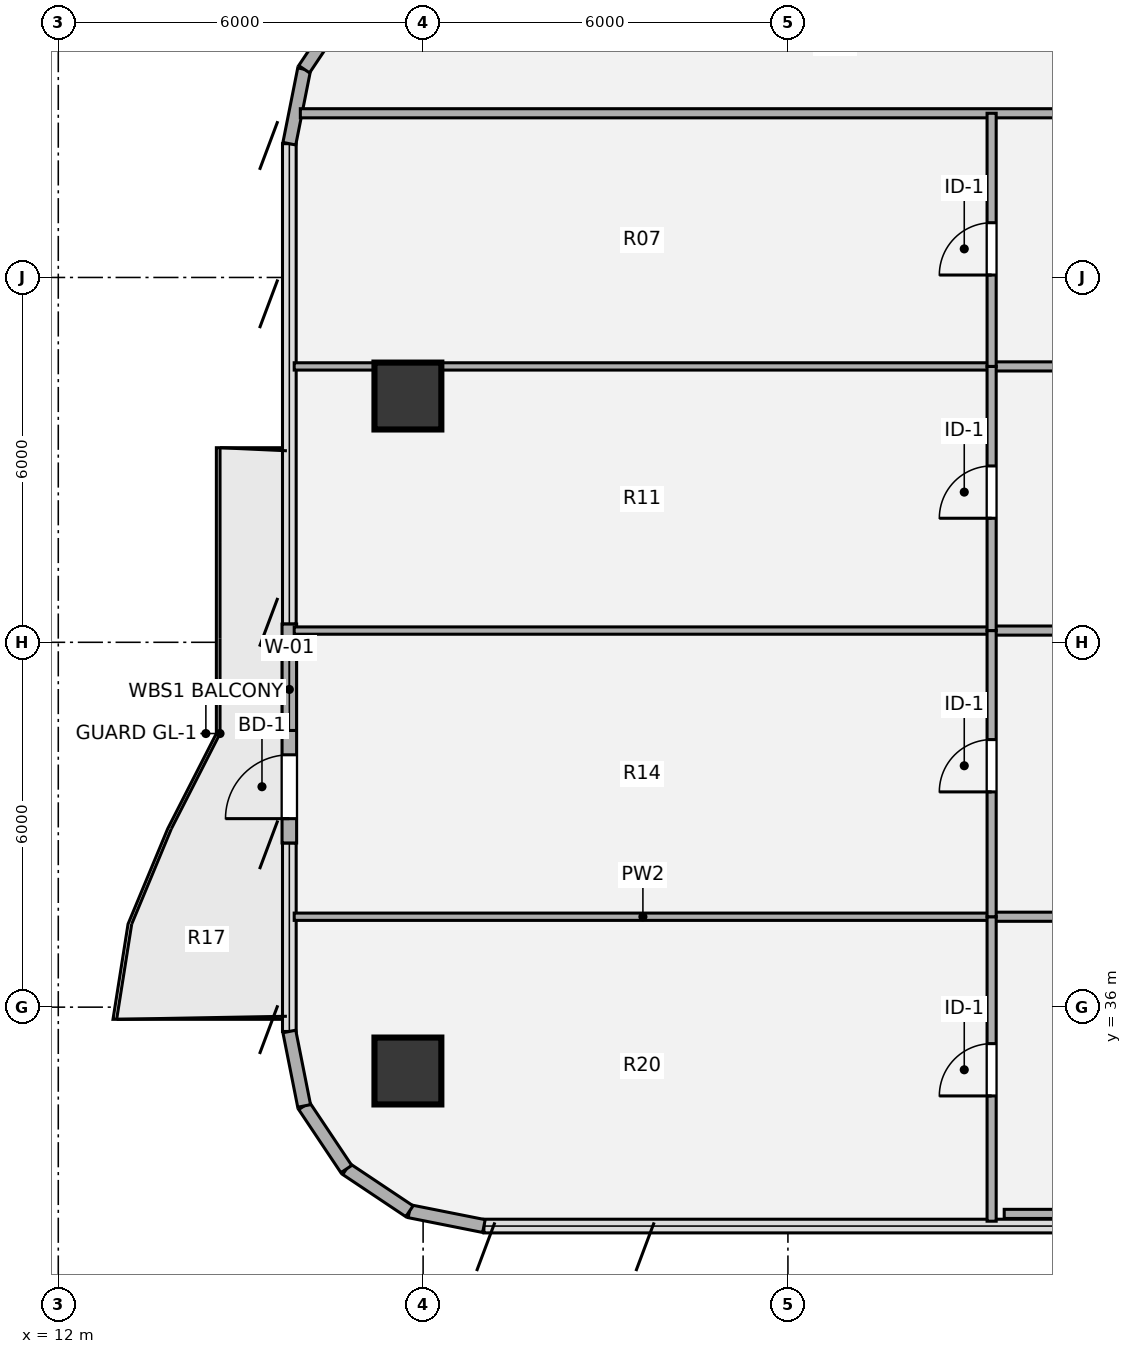
"""IFC4 building model, lengths in metres.
Left out: names, types, materials, properties, quantities, classifications, styles, units other than length and angle.
Written with IfcOpenShell. Run it as: python <this file> out.ifc"""

import sys

from ifc_helpers import new_model, si_unit, direction, frame, frame_2d, origin, origin_2d, place, context, subcontext, project, spatial, rectangle, hollow_circle, extrude, source, transform, mapped, element, fill, save


model = new_model("IFC4")
c1 = context("Model", 3, precision=1e-05, world=origin(), true_north=direction((0.0, 1.0)))
c2 = subcontext(c1, "Body", "Model", "MODEL_VIEW")
j1 = project(units=[si_unit("LENGTHUNIT", "METRE"), si_unit("PLANEANGLEUNIT", "RADIAN")], contexts=[c1])
p1 = place(None, origin())
s1 = spatial("IfcSite", under=j1, at=p1, CompositionType="ELEMENT")
p2 = place(p1, origin())
s2 = spatial("IfcBuilding", under=s1, at=p2, CompositionType="ELEMENT")
p3 = place(p2, frame((0.0, 0.0, 201.78)))
s3 = spatial("IfcBuildingStorey", under=s2, at=p3, CompositionType="ELEMENT", Elevation=201.78)
m1 = source(origin(), c2, "Body", "SweptSolid", [
    extrude(hollow_circle(Radius=0.55, WallThickness=0.04, at=origin_2d()), origin(), (0.0, 0.0, 1.0), 3.78),
])
for number, where, z_axis, x_axis in (
    (1, (17.75, 34.95, 0.0), (0.0, 0.0, 1.0), (1.0, 0.0, 0.0)),
    (2, (17.75, 46.05, 0.0), (0.0, 0.0, 1.0), (1.0, 0.0, 0.0)),
):
    element("IfcColumn", number, at=place(p3, frame(where, z_axis=z_axis, x_axis=x_axis)), inside=s3, PredefinedType="COLUMN", context=c2, shape_type="MappedRepresentation", body=[
        mapped(m1, transform((0.0, 0.0, 0.0), x_axis=(1.0, 0.0, 0.0), y_axis=(0.0, 1.0, 0.0), z_axis=(0.0, 0.0, 1.0), scale=1.0)),
    ])
for number, where, z_axis, x_axis in (
    (3, (19.0, 32.4, 0.0), (0.0, 0.0, 1.0), (-0.981, 0.195, 0.0)),
    (4, (17.775, 32.644, 0.0), (0.0, 0.0, 1.0), (-0.831, 0.556, 0.0)),
    (5, (16.737, 33.337, 0.0), (0.0, 0.0, 1.0), (-0.556, 0.831, 0.0)),
    (6, (16.044, 34.375, 0.0), (0.0, 0.0, 1.0), (-0.195, 0.981, 0.0)),
):
    element("IfcWall", number, at=place(p3, frame(where, z_axis=z_axis, x_axis=x_axis)), inside=s3, PredefinedType="SOLIDWALL", context=c2, shape_type="SweptSolid", body=[
        extrude(rectangle(XDim=1.249, YDim=0.215, at=frame_2d((0.624, 0.0))), origin(), (0.0, 0.0, 1.0), 3.53),
    ])
p4 = place(p3, frame((15.8, 38.7, 0.0), z_axis=(0.0, 0.0, 1.0), x_axis=(0.0, 1.0, 0.0)))
e7 = element("IfcWall", 7, at=p4, inside=s3, PredefinedType="SOLIDWALL", context=c2, shape_type="SweptSolid", body=[
    extrude(rectangle(XDim=3.6, YDim=0.24, at=frame_2d((1.8, 0.0))), origin(), (0.0, 0.0, 1.0), 3.53),
])
p5 = place(p4, frame((0.4, 0.0, 0.0)))
e8 = element("IfcOpeningElement", 8, at=p5, cuts=e7, PredefinedType="OPENING", context=c2, shape_type="SweptSolid", body=[
    extrude(rectangle(XDim=1.05, YDim=2.15, at=origin_2d()), frame((0.525, 0.13, 1.075), z_axis=(0.0, -1.0, 0.0), x_axis=(1.0, 0.0, 0.0)), (0.0, 0.0, 1.0), 0.26),
])
p6 = place(p4, frame((1.85, 0.0, 0.85)))
e9 = element("IfcOpeningElement", 9, at=p6, cuts=e7, PredefinedType="OPENING", context=c2, shape_type="SweptSolid", body=[
    extrude(rectangle(XDim=1.35, YDim=1.35, at=origin_2d()), frame((0.675, 0.13, 0.675), z_axis=(0.0, -1.0, 0.0), x_axis=(1.0, 0.0, 0.0)), (0.0, 0.0, 1.0), 0.26),
])
for number, where, z_axis, x_axis in (
    (10, (15.8, 50.2, 0.0), (0.0, 0.0, 1.0), (0.195, 0.981, 0.0)),
    (11, (16.044, 51.425, 0.0), (0.0, 0.0, 1.0), (0.556, 0.831, 0.0)),
):
    element("IfcWall", number, at=place(p3, frame(where, z_axis=z_axis, x_axis=x_axis)), inside=s3, PredefinedType="SOLIDWALL", context=c2, shape_type="SweptSolid", body=[
        extrude(rectangle(XDim=1.249, YDim=0.215, at=frame_2d((0.624, 0.0))), origin(), (0.0, 0.0, 1.0), 3.53),
    ])
p7 = place(p3, frame((27.557, 32.6, 0.0), z_axis=(0.0, 0.0, 1.0), x_axis=(1.0, 0.0, 0.0)))
e12 = element("IfcWall", 12, at=p7, inside=s3, PredefinedType="PARTITIONING", context=c2, shape_type="SweptSolid", body=[
    extrude(rectangle(XDim=5.993, YDim=0.15, at=frame_2d((2.997, 0.0))), origin(), (0.0, 0.0, 1.0), 3.5),
])
p8 = place(p3, frame((15.88, 37.487, 0.0), z_axis=(0.0, 0.0, 1.0), x_axis=(1.0, 0.0, 0.0)))
e13 = element("IfcWall", 13, at=p8, inside=s3, PredefinedType="PARTITIONING", context=c2, shape_type="SweptSolid", body=[
    extrude(rectangle(XDim=11.47, YDim=0.12, at=frame_2d((5.735, 0.0))), origin(), (0.0, 0.0, 1.0), 3.055),
])
p9 = place(p3, frame((27.35, 37.487, 0.0), z_axis=(0.0, 0.0, 1.0), x_axis=(1.0, 0.0, 0.0)))
e14 = element("IfcWall", 14, at=p9, inside=s3, PredefinedType="PARTITIONING", context=c2, shape_type="SweptSolid", body=[
    extrude(rectangle(XDim=6.2, YDim=0.15, at=frame_2d((3.1, 0.0))), origin(), (0.0, 0.0, 1.0), 3.055),
])
p10 = place(p3, frame((15.88, 42.193, 0.0), z_axis=(0.0, 0.0, 1.0), x_axis=(1.0, 0.0, 0.0)))
e15 = element("IfcWall", 15, at=p10, inside=s3, PredefinedType="PARTITIONING", context=c2, shape_type="SweptSolid", body=[
    extrude(rectangle(XDim=11.47, YDim=0.12, at=frame_2d((5.735, 0.0))), origin(), (0.0, 0.0, 1.0), 2.982),
])
p11 = place(p3, frame((27.35, 42.193, 0.0), z_axis=(0.0, 0.0, 1.0), x_axis=(1.0, 0.0, 0.0)))
e16 = element("IfcWall", 16, at=p11, inside=s3, PredefinedType="PARTITIONING", context=c2, shape_type="SweptSolid", body=[
    extrude(rectangle(XDim=6.2, YDim=0.15, at=frame_2d((3.1, 0.0))), origin(), (0.0, 0.0, 1.0), 2.982),
])
p12 = place(p3, frame((15.88, 46.537, 0.0), z_axis=(0.0, 0.0, 1.0), x_axis=(1.0, 0.0, 0.0)))
e17 = element("IfcWall", 17, at=p12, inside=s3, PredefinedType="PARTITIONING", context=c2, shape_type="SweptSolid", body=[
    extrude(rectangle(XDim=11.47, YDim=0.12, at=frame_2d((5.735, 0.0))), origin(), (0.0, 0.0, 1.0), 3.5),
])
p13 = place(p3, frame((27.35, 46.537, 0.0), z_axis=(0.0, 0.0, 1.0), x_axis=(1.0, 0.0, 0.0)))
e18 = element("IfcWall", 18, at=p13, inside=s3, PredefinedType="PARTITIONING", context=c2, shape_type="SweptSolid", body=[
    extrude(rectangle(XDim=6.2, YDim=0.15, at=frame_2d((3.1, 0.0))), origin(), (0.0, 0.0, 1.0), 3.259),
])
p14 = place(p3, frame((15.981, 50.7, 0.0), z_axis=(0.0, 0.0, 1.0), x_axis=(1.0, 0.0, 0.0)))
e19 = element("IfcWall", 19, at=p14, inside=s3, PredefinedType="PARTITIONING", context=c2, shape_type="SweptSolid", body=[
    extrude(rectangle(XDim=17.569, YDim=0.15, at=frame_2d((8.785, 0.0))), origin(), (0.0, 0.0, 1.0), 3.308),
])
p15 = place(p3, frame((27.35, 32.48, 0.0), z_axis=(0.0, 0.0, 1.0), x_axis=(0.0, 1.0, 0.0)))
e20 = element("IfcWall", 20, at=p15, inside=s3, PredefinedType="PARTITIONING", context=c2, shape_type="SweptSolid", body=[
    extrude(rectangle(XDim=5.007, YDim=0.15, at=frame_2d((2.503, 0.0))), origin(), (0.0, 0.0, 1.0), 3.5),
])
p16 = place(p15, frame((2.06, 0.0, 0.0)))
e21 = element("IfcOpeningElement", 21, at=p16, cuts=e20, PredefinedType="OPENING", context=c2, shape_type="SweptSolid", body=[
    extrude(rectangle(XDim=0.86, YDim=2.1, at=origin_2d()), frame((0.43, 0.085, 1.05), z_axis=(0.0, -1.0, 0.0), x_axis=(1.0, 0.0, 0.0)), (0.0, 0.0, 1.0), 0.17),
])
p17 = place(p3, frame((27.35, 37.487, 0.0), z_axis=(0.0, 0.0, 1.0), x_axis=(0.0, 1.0, 0.0)))
e22 = element("IfcWall", 22, at=p17, inside=s3, PredefinedType="PARTITIONING", context=c2, shape_type="SweptSolid", body=[
    extrude(rectangle(XDim=4.706, YDim=0.15, at=frame_2d((2.353, 0.0))), origin(), (0.0, 0.0, 1.0), 3.5),
])
p18 = place(p17, frame((2.053, 0.0, 0.0)))
e23 = element("IfcOpeningElement", 23, at=p18, cuts=e22, PredefinedType="OPENING", context=c2, shape_type="SweptSolid", body=[
    extrude(rectangle(XDim=0.86, YDim=2.1, at=origin_2d()), frame((0.43, 0.085, 1.05), z_axis=(0.0, -1.0, 0.0), x_axis=(1.0, 0.0, 0.0)), (0.0, 0.0, 1.0), 0.17),
])
p19 = place(p3, frame((27.35, 42.193, 0.0), z_axis=(0.0, 0.0, 1.0), x_axis=(0.0, 1.0, 0.0)))
e24 = element("IfcWall", 24, at=p19, inside=s3, PredefinedType="PARTITIONING", context=c2, shape_type="SweptSolid", body=[
    extrude(rectangle(XDim=4.344, YDim=0.15, at=frame_2d((2.172, 0.0))), origin(), (0.0, 0.0, 1.0), 3.5),
])
p20 = place(p19, frame((1.847, 0.0, 0.0)))
e25 = element("IfcOpeningElement", 25, at=p20, cuts=e24, PredefinedType="OPENING", context=c2, shape_type="SweptSolid", body=[
    extrude(rectangle(XDim=0.86, YDim=2.1, at=origin_2d()), frame((0.43, 0.085, 1.05), z_axis=(0.0, -1.0, 0.0), x_axis=(1.0, 0.0, 0.0)), (0.0, 0.0, 1.0), 0.17),
])
p21 = place(p3, frame((27.35, 46.537, 0.0), z_axis=(0.0, 0.0, 1.0), x_axis=(0.0, 1.0, 0.0)))
e26 = element("IfcWall", 26, at=p21, inside=s3, PredefinedType="PARTITIONING", context=c2, shape_type="SweptSolid", body=[
    extrude(rectangle(XDim=4.163, YDim=0.15, at=frame_2d((2.082, 0.0))), origin(), (0.0, 0.0, 1.0), 3.5),
])
p22 = place(p21, frame((1.503, 0.0, 0.0)))
e27 = element("IfcOpeningElement", 27, at=p22, cuts=e26, PredefinedType="OPENING", context=c2, shape_type="SweptSolid", body=[
    extrude(rectangle(XDim=0.86, YDim=2.1, at=origin_2d()), frame((0.43, 0.085, 1.05), z_axis=(0.0, -1.0, 0.0), x_axis=(1.0, 0.0, 0.0)), (0.0, 0.0, 1.0), 0.17),
])
m2 = source(origin(), c2, "Body", "SweptSolid", [
    extrude(rectangle(XDim=1.05, YDim=2.15, at=origin_2d()), frame((0.525, 0.025, 1.075), z_axis=(0.0, -1.0, 0.0), x_axis=(1.0, 0.0, 0.0)), (0.0, 0.0, 1.0), 0.05),
])
p23 = place(p5, origin())
e28 = element("IfcDoor", 28, at=p23, inside=s3, OperationType="SINGLE_SWING_LEFT", PredefinedType="DOOR", context=c2, shape_type="MappedRepresentation", body=[
    mapped(m2, transform((0.0, 0.0, 0.0), x_axis=(1.0, 0.0, 0.0), y_axis=(0.0, 1.0, 0.0), z_axis=(0.0, 0.0, 1.0), scale=1.0)),
])
fill(e8, e28)
m3 = source(origin(), c2, "Body", "SweptSolid", [
    extrude(rectangle(XDim=1.35, YDim=1.35, at=origin_2d()), frame((0.675, 0.03, 0.675), z_axis=(0.0, -1.0, 0.0), x_axis=(1.0, 0.0, 0.0)), (0.0, 0.0, 1.0), 0.06),
])
p24 = place(p6, origin())
e29 = element("IfcWindow", 29, at=p24, inside=s3, PartitioningType="SINGLE_PANEL", PredefinedType="WINDOW", context=c2, shape_type="MappedRepresentation", body=[
    mapped(m3, transform((0.0, 0.0, 0.0), x_axis=(1.0, 0.0, 0.0), y_axis=(0.0, 1.0, 0.0), z_axis=(0.0, 0.0, 1.0), scale=1.0)),
])
fill(e9, e29)
m4 = source(origin(), c2, "Body", "SweptSolid", [
    extrude(rectangle(XDim=0.86, YDim=2.1, at=origin_2d()), frame((0.43, 0.025, 1.05), z_axis=(0.0, -1.0, 0.0), x_axis=(1.0, 0.0, 0.0)), (0.0, 0.0, 1.0), 0.05),
])
p25 = place(p16, origin())
e30 = element("IfcDoor", 30, at=p25, inside=s3, OperationType="SINGLE_SWING_LEFT", PredefinedType="DOOR", context=c2, shape_type="MappedRepresentation", body=[
    mapped(m4, transform((0.0, 0.0, 0.0), x_axis=(1.0, 0.0, 0.0), y_axis=(0.0, 1.0, 0.0), z_axis=(0.0, 0.0, 1.0), scale=1.0)),
])
fill(e21, e30)
p26 = place(p18, origin())
e31 = element("IfcDoor", 31, at=p26, inside=s3, OperationType="SINGLE_SWING_LEFT", PredefinedType="DOOR", context=c2, shape_type="MappedRepresentation", body=[
    mapped(m4, transform((0.0, 0.0, 0.0), x_axis=(1.0, 0.0, 0.0), y_axis=(0.0, 1.0, 0.0), z_axis=(0.0, 0.0, 1.0), scale=1.0)),
])
fill(e23, e31)
p27 = place(p20, origin())
e32 = element("IfcDoor", 32, at=p27, inside=s3, OperationType="SINGLE_SWING_LEFT", PredefinedType="DOOR", context=c2, shape_type="MappedRepresentation", body=[
    mapped(m4, transform((0.0, 0.0, 0.0), x_axis=(1.0, 0.0, 0.0), y_axis=(0.0, 1.0, 0.0), z_axis=(0.0, 0.0, 1.0), scale=1.0)),
])
fill(e25, e32)
p28 = place(p22, origin())
e33 = element("IfcDoor", 33, at=p28, inside=s3, OperationType="SINGLE_SWING_LEFT", PredefinedType="DOOR", context=c2, shape_type="MappedRepresentation", body=[
    mapped(m4, transform((0.0, 0.0, 0.0), x_axis=(1.0, 0.0, 0.0), y_axis=(0.0, 1.0, 0.0), z_axis=(0.0, 0.0, 1.0), scale=1.0)),
])
fill(e27, e33)
save(model, sys.argv[1])
